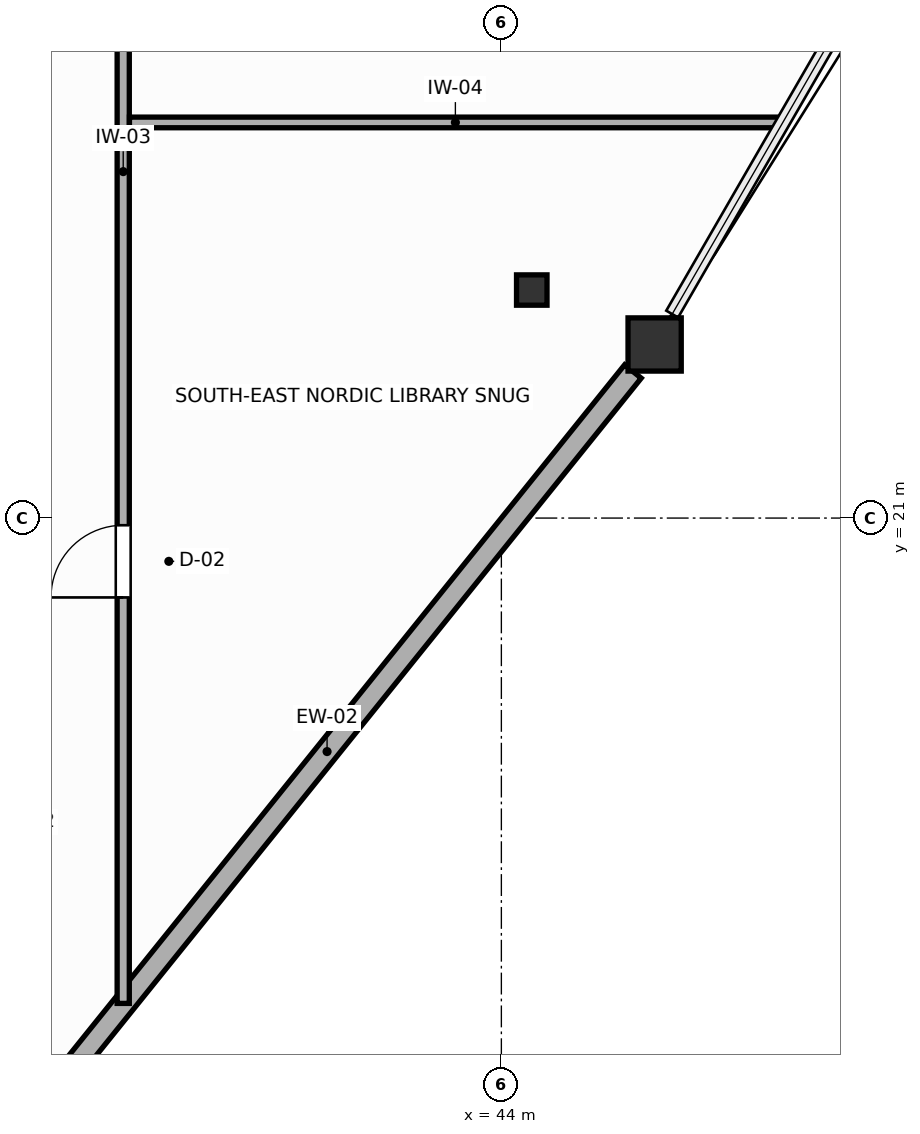
"""IFC4 building model, lengths in metres.
Left out: names, types, materials, properties, quantities, classifications, styles, units other than length and angle.
Written with IfcOpenShell. Run it as: python <this file> out.ifc"""

import sys

from ifc_helpers import new_model, si_unit, direction, frame, frame_2d, origin, origin_2d, place, context, subcontext, project, spatial, rectangle, i_section, extrude, source, transform, mapped, element, fill, save


model = new_model("IFC4")
c1 = context("Model", 3, precision=1e-05, world=origin(), true_north=direction((0.0, 1.0)))
c2 = subcontext(c1, "Body", "Model", "MODEL_VIEW")
j1 = project(units=[si_unit("LENGTHUNIT", "METRE"), si_unit("PLANEANGLEUNIT", "RADIAN")], contexts=[c1])
p1 = place(None, origin())
s1 = spatial("IfcSite", under=j1, at=p1, CompositionType="ELEMENT")
p2 = place(p1, origin())
s2 = spatial("IfcBuilding", under=s1, at=p2, CompositionType="ELEMENT")
p3 = place(p2, frame((0.0, 0.0, 250.2)))
s3 = spatial("IfcBuildingStorey", under=s2, at=p3, CompositionType="ELEMENT", Elevation=250.2)
m1 = source(origin(), c2, "Body", "SweptSolid", [
    extrude(i_section(OverallWidth=0.401, OverallDepth=0.399, WebThickness=0.022, FlangeThickness=0.036, FilletRadius=0.015, at=origin_2d()), origin(), (0.0, 0.0, 1.0), 3.6),
])
p4 = place(p3, frame((44.4, 24.0, 0.0), z_axis=(0.0, 0.0, 1.0), x_axis=(1.0, 0.0, 0.0)))
e1 = element("IfcColumn", 1, at=p4, inside=s3, PredefinedType="COLUMN", context=c2, shape_type="MappedRepresentation", body=[
    mapped(m1, transform((0.0, 0.0, 0.0), scale=1.0)),
])
m2 = source(origin(), c2, "Body", "SweptSolid", [
    extrude(rectangle(XDim=0.7, YDim=0.7, at=origin_2d()), origin(), (0.0, 0.0, 1.0), 3.6),
])
p5 = place(p3, frame((46.017, 23.284, 0.0), z_axis=(0.0, 0.0, 1.0), x_axis=(1.0, 0.0, 0.0)))
e2 = element("IfcColumn", 2, at=p5, inside=s3, PredefinedType="COLUMN", context=c2, shape_type="MappedRepresentation", body=[
    mapped(m2, transform((0.0, 0.0, 0.0), scale=1.0)),
])
p6 = place(p3, frame((37.683, 12.927, 0.0), z_axis=(0.0, 0.0, 1.0), x_axis=(0.626898207352, 0.779101172903, 0.0)))
e3 = element("IfcWall", 3, at=p6, inside=s3, PredefinedType="SOLIDWALL", context=c2, shape_type="SweptSolid", body=[
    extrude(rectangle(XDim=12.837, YDim=0.28, at=frame_2d((6.418, 0.0))), origin(), (0.0, 0.0, 1.0), 1.88),
])
p7 = place(p3, frame((39.025, 14.615, 0.0), z_axis=(0.0, 0.0, 1.0), x_axis=(0.0, 1.0, 0.0)))
e4 = element("IfcWall", 4, at=p7, inside=s3, PredefinedType="PARTITIONING", context=c2, shape_type="SweptSolid", body=[
    extrude(rectangle(XDim=15.415, YDim=0.16, at=frame_2d((7.708, 0.0))), origin(), (0.0, 0.0, 1.0), 3.41),
])
p8 = place(p7, frame((5.341, 0.0, 0.0)))
e5 = element("IfcOpeningElement", 5, at=p8, cuts=e4, PredefinedType="OPENING", context=c2, shape_type="SweptSolid", body=[
    extrude(rectangle(XDim=0.95, YDim=2.05, at=frame_2d((0.475, 1.025))), frame((0.0, 0.09, 0.0), z_axis=(0.0, -1.0, 0.0), x_axis=(1.0, 0.0, 0.0)), (0.0, 0.0, 1.0), 0.18),
])
p9 = place(p3, frame((39.107, 26.205, 0.0), z_axis=(0.0, 0.0, 1.0), x_axis=(1.0, 0.0, 0.0)))
e6 = element("IfcWall", 6, at=p9, inside=s3, PredefinedType="PARTITIONING", context=c2, shape_type="SweptSolid", body=[
    extrude(rectangle(XDim=8.576, YDim=0.14, at=frame_2d((4.288, 0.0))), origin(), (0.0, 0.0, 1.0), 3.41),
])
p10 = place(p8, origin())
e7 = element("IfcDoor", 7, at=p10, inside=s3, OperationType="SINGLE_SWING_LEFT", PredefinedType="DOOR", context=c2, shape_type="SweptSolid", body=[
    extrude(rectangle(XDim=0.95, YDim=2.05, at=frame_2d((0.475, 1.025))), frame((0.0, 0.025, 0.0), z_axis=(0.0, -1.0, 0.0), x_axis=(1.0, 0.0, 0.0)), (0.0, 0.0, 1.0), 0.05),
])
fill(e5, e7)
save(model, sys.argv[1])
